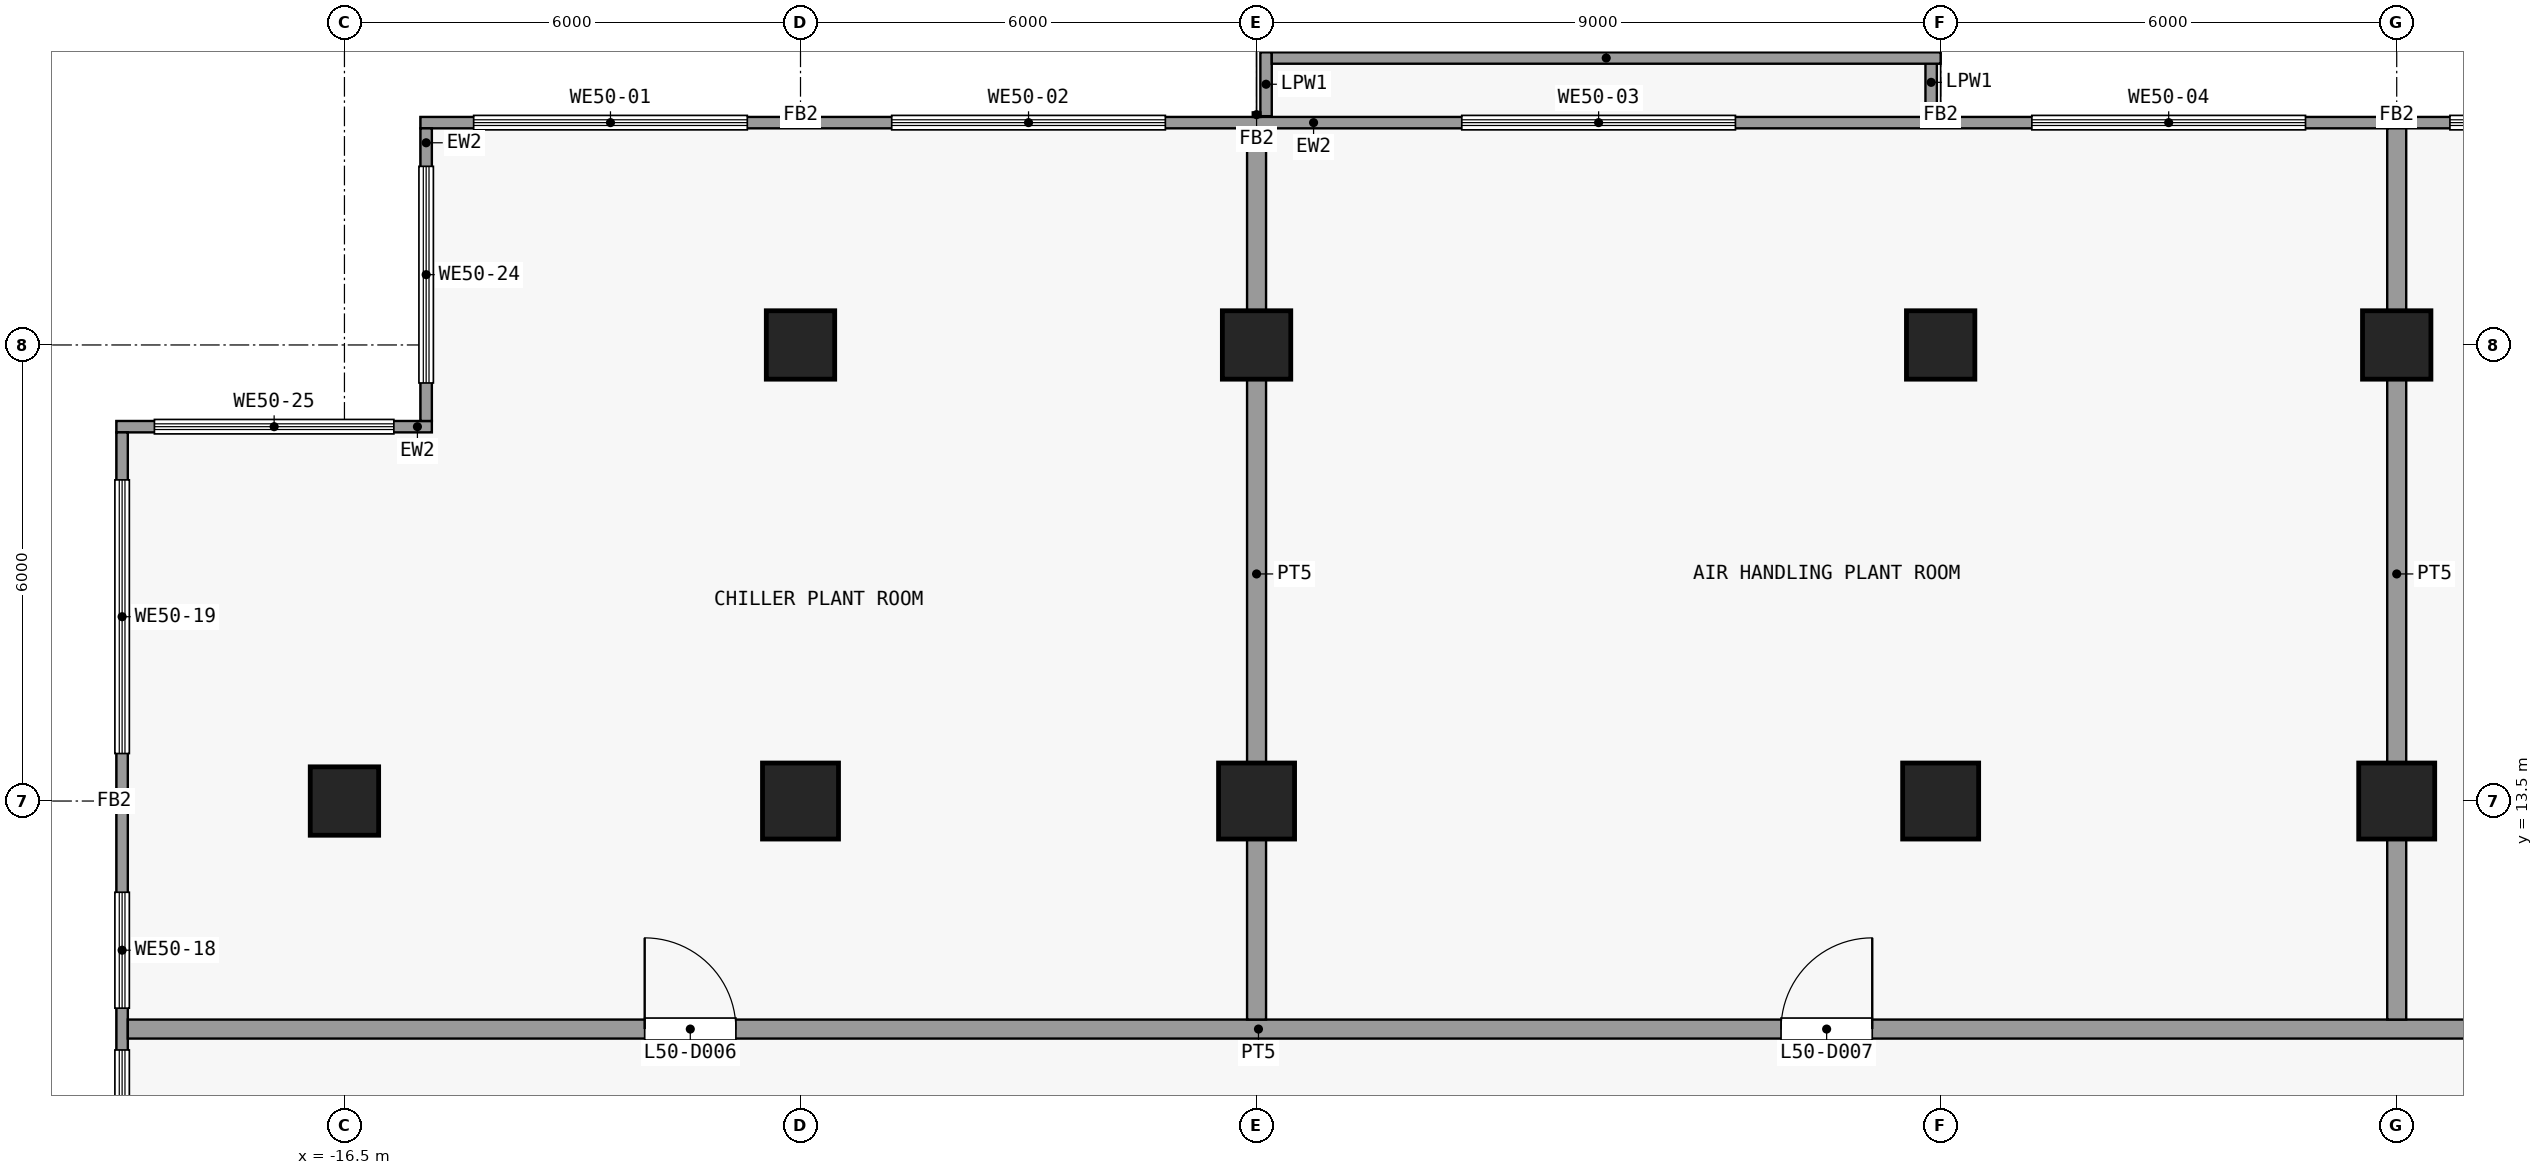
"""IFC4 building model, lengths in metres.
Left out: names, types, materials, properties, quantities, classifications, styles, units other than length and angle.
Written with IfcOpenShell. Run it as: python <this file> out.ifc"""

import sys

from ifc_helpers import new_model, si_unit, direction, frame, frame_2d, origin, origin_2d, place, context, subcontext, project, spatial, rectangle, extrude, element, fill, save


model = new_model("IFC4")
c1 = context("Model", 3, precision=1e-05, world=origin(), true_north=direction((0.0, 1.0)))
c2 = subcontext(c1, "Body", "Model", "MODEL_VIEW")
j1 = project(units=[si_unit("LENGTHUNIT", "METRE"), si_unit("PLANEANGLEUNIT", "RADIAN")], contexts=[c1])
p1 = place(None, origin())
s1 = spatial("IfcSite", under=j1, at=p1, CompositionType="ELEMENT")
p2 = place(p1, origin())
s2 = spatial("IfcBuilding", under=s1, at=p2, CompositionType="ELEMENT")
p3 = place(p2, frame((0.0, 0.0, 199.7)))
s3 = spatial("IfcBuildingStorey", under=s2, at=p3, CompositionType="ELEMENT", Elevation=199.7)
p4 = place(p3, frame((-16.5, 13.5, 0.0), z_axis=(0.0, 0.0, 1.0), x_axis=(1.0, 0.0, 0.0)))
e1 = element("IfcColumn", 1, at=p4, inside=s3, PredefinedType="COLUMN", context=c2, shape_type="SweptSolid", body=[
    extrude(rectangle(XDim=0.9, YDim=0.9, at=origin_2d()), origin(), (0.0, 0.0, 1.0), 5.4),
])
p5 = place(p3, frame((-10.5, 13.5, 0.0), z_axis=(0.0, 0.0, 1.0), x_axis=(1.0, 0.0, 0.0)))
e2 = element("IfcColumn", 2, at=p5, inside=s3, PredefinedType="COLUMN", context=c2, shape_type="SweptSolid", body=[
    extrude(rectangle(XDim=1.0, YDim=1.0, at=origin_2d()), origin(), (0.0, 0.0, 1.0), 5.4),
])
p6 = place(p3, frame((-10.5, 19.5, 0.0), z_axis=(0.0, 0.0, 1.0), x_axis=(1.0, 0.0, 0.0)))
e3 = element("IfcColumn", 3, at=p6, inside=s3, PredefinedType="COLUMN", context=c2, shape_type="SweptSolid", body=[
    extrude(rectangle(XDim=0.9, YDim=0.9, at=origin_2d()), origin(), (0.0, 0.0, 1.0), 5.4),
])
p7 = place(p3, frame((-4.5, 13.5, 0.0), z_axis=(0.0, 0.0, 1.0), x_axis=(1.0, 0.0, 0.0)))
e4 = element("IfcColumn", 4, at=p7, inside=s3, PredefinedType="COLUMN", context=c2, shape_type="SweptSolid", body=[
    extrude(rectangle(XDim=1.0, YDim=1.0, at=origin_2d()), origin(), (0.0, 0.0, 1.0), 5.4),
])
p8 = place(p3, frame((-4.5, 19.5, 0.0), z_axis=(0.0, 0.0, 1.0), x_axis=(1.0, 0.0, 0.0)))
e5 = element("IfcColumn", 5, at=p8, inside=s3, PredefinedType="COLUMN", context=c2, shape_type="SweptSolid", body=[
    extrude(rectangle(XDim=0.9, YDim=0.9, at=origin_2d()), origin(), (0.0, 0.0, 1.0), 5.4),
])
p9 = place(p3, frame((4.5, 13.5, 0.0), z_axis=(0.0, 0.0, 1.0), x_axis=(1.0, 0.0, 0.0)))
e6 = element("IfcColumn", 6, at=p9, inside=s3, PredefinedType="COLUMN", context=c2, shape_type="SweptSolid", body=[
    extrude(rectangle(XDim=1.0, YDim=1.0, at=origin_2d()), origin(), (0.0, 0.0, 1.0), 5.4),
])
p10 = place(p3, frame((4.5, 19.5, 0.0), z_axis=(0.0, 0.0, 1.0), x_axis=(1.0, 0.0, 0.0)))
e7 = element("IfcColumn", 7, at=p10, inside=s3, PredefinedType="COLUMN", context=c2, shape_type="SweptSolid", body=[
    extrude(rectangle(XDim=0.9, YDim=0.9, at=origin_2d()), origin(), (0.0, 0.0, 1.0), 5.4),
])
p11 = place(p3, frame((10.5, 13.5, 0.0), z_axis=(0.0, 0.0, 1.0), x_axis=(1.0, 0.0, 0.0)))
e8 = element("IfcColumn", 8, at=p11, inside=s3, PredefinedType="COLUMN", context=c2, shape_type="SweptSolid", body=[
    extrude(rectangle(XDim=1.0, YDim=1.0, at=origin_2d()), origin(), (0.0, 0.0, 1.0), 5.4),
])
p12 = place(p3, frame((10.5, 19.5, 0.0), z_axis=(0.0, 0.0, 1.0), x_axis=(1.0, 0.0, 0.0)))
e9 = element("IfcColumn", 9, at=p12, inside=s3, PredefinedType="COLUMN", context=c2, shape_type="SweptSolid", body=[
    extrude(rectangle(XDim=0.9, YDim=0.9, at=origin_2d()), origin(), (0.0, 0.0, 1.0), 5.4),
])
p13 = place(p3, frame((-15.5, 22.425, 0.0), z_axis=(0.0, 0.0, 1.0), x_axis=(1.0, 0.0, 0.0)))
e10 = element("IfcWall", 10, at=p13, inside=s3, PredefinedType="SOLIDWALL", context=c2, shape_type="SweptSolid", body=[
    extrude(rectangle(XDim=31.0, YDim=0.15, at=frame_2d((15.5, 0.0))), origin(), (0.0, 0.0, 1.0), 5.0),
])
p14 = place(p13, frame((0.7, 0.0, 1.2)))
e11 = element("IfcOpeningElement", 11, at=p14, cuts=e10, PredefinedType="OPENING", context=c2, shape_type="SweptSolid", body=[
    extrude(rectangle(XDim=3.6, YDim=3.0, at=frame_2d((1.8, 1.5))), frame((0.0, 0.085, 0.0), z_axis=(0.0, -1.0, 0.0), x_axis=(1.0, 0.0, 0.0)), (0.0, 0.0, 1.0), 0.17),
])
p15 = place(p13, frame((6.2, 0.0, 1.2)))
e12 = element("IfcOpeningElement", 12, at=p15, cuts=e10, PredefinedType="OPENING", context=c2, shape_type="SweptSolid", body=[
    extrude(rectangle(XDim=3.6, YDim=3.0, at=frame_2d((1.8, 1.5))), frame((0.0, 0.085, 0.0), z_axis=(0.0, -1.0, 0.0), x_axis=(1.0, 0.0, 0.0)), (0.0, 0.0, 1.0), 0.17),
])
p16 = place(p13, frame((13.7, 0.0, 1.2)))
e13 = element("IfcOpeningElement", 13, at=p16, cuts=e10, PredefinedType="OPENING", context=c2, shape_type="SweptSolid", body=[
    extrude(rectangle(XDim=3.6, YDim=3.0, at=frame_2d((1.8, 1.5))), frame((0.0, 0.085, 0.0), z_axis=(0.0, -1.0, 0.0), x_axis=(1.0, 0.0, 0.0)), (0.0, 0.0, 1.0), 0.17),
])
p17 = place(p13, frame((21.2, 0.0, 1.2)))
e14 = element("IfcOpeningElement", 14, at=p17, cuts=e10, PredefinedType="OPENING", context=c2, shape_type="SweptSolid", body=[
    extrude(rectangle(XDim=3.6, YDim=3.0, at=frame_2d((1.8, 1.5))), frame((0.0, 0.085, 0.0), z_axis=(0.0, -1.0, 0.0), x_axis=(1.0, 0.0, 0.0)), (0.0, 0.0, 1.0), 0.17),
])
p18 = place(p13, frame((26.7, 0.0, 1.2)))
e15 = element("IfcOpeningElement", 15, at=p18, cuts=e10, PredefinedType="OPENING", context=c2, shape_type="SweptSolid", body=[
    extrude(rectangle(XDim=3.6, YDim=3.0, at=frame_2d((1.8, 1.5))), frame((0.0, 0.085, 0.0), z_axis=(0.0, -1.0, 0.0), x_axis=(1.0, 0.0, 0.0)), (0.0, 0.0, 1.0), 0.17),
])
p19 = place(p3, frame((-19.425, -21.35, 0.0), z_axis=(0.0, 0.0, 1.0), x_axis=(0.0, 1.0, 0.0)))
e16 = element("IfcWall", 16, at=p19, inside=s3, PredefinedType="SOLIDWALL", context=c2, shape_type="SweptSolid", body=[
    extrude(rectangle(XDim=39.7, YDim=0.15, at=frame_2d((19.85, 0.0))), origin(), (0.0, 0.0, 1.0), 5.0),
])
p20 = place(p19, frame((2.125, 0.0, 1.2)))
e17 = element("IfcOpeningElement", 17, at=p20, cuts=e16, PredefinedType="OPENING", context=c2, shape_type="SweptSolid", body=[
    extrude(rectangle(XDim=3.6, YDim=3.0, at=frame_2d((1.8, 1.5))), frame((0.0, 0.085, 0.0), z_axis=(0.0, -1.0, 0.0), x_axis=(1.0, 0.0, 0.0)), (0.0, 0.0, 1.0), 0.17),
])
p21 = place(p19, frame((10.55, 0.0, 1.2)))
e18 = element("IfcOpeningElement", 18, at=p21, cuts=e16, PredefinedType="OPENING", context=c2, shape_type="SweptSolid", body=[
    extrude(rectangle(XDim=2.625, YDim=3.0, at=frame_2d((1.312, 1.5))), frame((0.0, 0.085, 0.0), z_axis=(0.0, -1.0, 0.0), x_axis=(1.0, 0.0, 0.0)), (0.0, 0.0, 1.0), 0.17),
])
p22 = place(p19, frame((18.05, 0.0, 1.2)))
e19 = element("IfcOpeningElement", 19, at=p22, cuts=e16, PredefinedType="OPENING", context=c2, shape_type="SweptSolid", body=[
    extrude(rectangle(XDim=3.6, YDim=3.0, at=frame_2d((1.8, 1.5))), frame((0.0, 0.085, 0.0), z_axis=(0.0, -1.0, 0.0), x_axis=(1.0, 0.0, 0.0)), (0.0, 0.0, 1.0), 0.17),
])
p23 = place(p19, frame((24.05, 0.0, 1.2)))
e20 = element("IfcOpeningElement", 20, at=p23, cuts=e16, PredefinedType="OPENING", context=c2, shape_type="SweptSolid", body=[
    extrude(rectangle(XDim=3.6, YDim=3.0, at=frame_2d((1.8, 1.5))), frame((0.0, 0.085, 0.0), z_axis=(0.0, -1.0, 0.0), x_axis=(1.0, 0.0, 0.0)), (0.0, 0.0, 1.0), 0.17),
])
p24 = place(p19, frame((30.05, 0.0, 1.2)))
e21 = element("IfcOpeningElement", 21, at=p24, cuts=e16, PredefinedType="OPENING", context=c2, shape_type="SweptSolid", body=[
    extrude(rectangle(XDim=1.525, YDim=3.0, at=frame_2d((0.762, 1.5))), frame((0.0, 0.085, 0.0), z_axis=(0.0, -1.0, 0.0), x_axis=(1.0, 0.0, 0.0)), (0.0, 0.0, 1.0), 0.17),
])
p25 = place(p19, frame((32.125, 0.0, 1.2)))
e22 = element("IfcOpeningElement", 22, at=p25, cuts=e16, PredefinedType="OPENING", context=c2, shape_type="SweptSolid", body=[
    extrude(rectangle(XDim=1.525, YDim=3.0, at=frame_2d((0.762, 1.5))), frame((0.0, 0.085, 0.0), z_axis=(0.0, -1.0, 0.0), x_axis=(1.0, 0.0, 0.0)), (0.0, 0.0, 1.0), 0.17),
])
p26 = place(p19, frame((35.475, 0.0, 1.2)))
e23 = element("IfcOpeningElement", 23, at=p26, cuts=e16, PredefinedType="OPENING", context=c2, shape_type="SweptSolid", body=[
    extrude(rectangle(XDim=3.6, YDim=3.0, at=frame_2d((1.8, 1.5))), frame((0.0, 0.085, 0.0), z_axis=(0.0, -1.0, 0.0), x_axis=(1.0, 0.0, 0.0)), (0.0, 0.0, 1.0), 0.17),
])
p27 = place(p3, frame((-15.425, 18.5, 0.0), z_axis=(0.0, 0.0, 1.0), x_axis=(0.0, 1.0, 0.0)))
e24 = element("IfcWall", 24, at=p27, inside=s3, PredefinedType="SOLIDWALL", context=c2, shape_type="SweptSolid", body=[
    extrude(rectangle(XDim=3.85, YDim=0.15, at=frame_2d((1.925, 0.0))), origin(), (0.0, 0.0, 1.0), 5.0),
])
p28 = place(p27, frame((0.5, 0.0, 1.2)))
e25 = element("IfcOpeningElement", 25, at=p28, cuts=e24, PredefinedType="OPENING", context=c2, shape_type="SweptSolid", body=[
    extrude(rectangle(XDim=2.85, YDim=3.0, at=frame_2d((1.425, 1.5))), frame((0.0, 0.085, 0.0), z_axis=(0.0, -1.0, 0.0), x_axis=(1.0, 0.0, 0.0)), (0.0, 0.0, 1.0), 0.17),
])
p29 = place(p3, frame((-19.5, 18.425, 0.0), z_axis=(0.0, 0.0, 1.0), x_axis=(1.0, 0.0, 0.0)))
e26 = element("IfcWall", 26, at=p29, inside=s3, PredefinedType="SOLIDWALL", context=c2, shape_type="SweptSolid", body=[
    extrude(rectangle(XDim=4.15, YDim=0.15, at=frame_2d((2.075, 0.0))), origin(), (0.0, 0.0, 1.0), 5.0),
])
p30 = place(p29, frame((0.5, 0.0, 1.2)))
e27 = element("IfcOpeningElement", 27, at=p30, cuts=e26, PredefinedType="OPENING", context=c2, shape_type="SweptSolid", body=[
    extrude(rectangle(XDim=3.15, YDim=3.0, at=frame_2d((1.575, 1.5))), frame((0.0, 0.085, 0.0), z_axis=(0.0, -1.0, 0.0), x_axis=(1.0, 0.0, 0.0)), (0.0, 0.0, 1.0), 0.17),
])
p31 = place(p3, frame((4.375, 23.4, 0.0), z_axis=(0.0, 0.0, 1.0), x_axis=(0.0, -1.0, 0.0)))
e28 = element("IfcWall", 28, at=p31, inside=s3, PredefinedType="PARAPET", context=c2, shape_type="SweptSolid", body=[
    extrude(rectangle(XDim=0.89, YDim=0.15, at=frame_2d((0.445, 0.0))), origin(), (0.0, 0.0, 1.0), 1.15),
])
p32 = place(p3, frame((-4.375, 22.51, 0.0), z_axis=(0.0, 0.0, 1.0), x_axis=(0.0, 1.0, 0.0)))
e29 = element("IfcWall", 29, at=p32, inside=s3, PredefinedType="PARAPET", context=c2, shape_type="SweptSolid", body=[
    extrude(rectangle(XDim=0.84, YDim=0.15, at=frame_2d((0.42, 0.0))), origin(), (0.0, 0.0, 1.0), 1.15),
])
p33 = place(p3, frame((-4.3, 23.275, 0.0), z_axis=(0.0, 0.0, 1.0), x_axis=(1.0, 0.0, 0.0)))
e30 = element("IfcWall", 30, at=p33, inside=s3, PredefinedType="PARAPET", context=c2, shape_type="SweptSolid", body=[
    extrude(rectangle(XDim=8.8, YDim=0.15, at=frame_2d((4.4, 0.0))), origin(), (0.0, 0.0, 1.0), 1.15),
])
p34 = place(p3, frame((-19.35, 10.5, 0.0), z_axis=(0.0, 0.0, 1.0), x_axis=(1.0, 0.0, 0.0)))
e31 = element("IfcWall", 31, at=p34, inside=s3, PredefinedType="PARTITIONING", context=c2, shape_type="SweptSolid", body=[
    extrude(rectangle(XDim=38.7, YDim=0.25, at=frame_2d((19.35, 0.0))), origin(), (0.0, 0.0, 1.0), 5.0),
])
p35 = place(p34, frame((6.8, 0.0, 0.0)))
e32 = element("IfcOpeningElement", 32, at=p35, cuts=e31, PredefinedType="OPENING", context=c2, shape_type="SweptSolid", body=[
    extrude(rectangle(XDim=1.2, YDim=2.1, at=frame_2d((0.6, 1.05))), frame((0.0, 0.135, 0.0), z_axis=(0.0, -1.0, 0.0), x_axis=(1.0, 0.0, 0.0)), (0.0, 0.0, 1.0), 0.27),
])
p36 = place(p34, frame((21.75, 0.0, 0.0)))
e33 = element("IfcOpeningElement", 33, at=p36, cuts=e31, PredefinedType="OPENING", context=c2, shape_type="SweptSolid", body=[
    extrude(rectangle(XDim=1.2, YDim=2.1, at=frame_2d((0.6, 1.05))), frame((0.0, 0.135, 0.0), z_axis=(0.0, -1.0, 0.0), x_axis=(1.0, 0.0, 0.0)), (0.0, 0.0, 1.0), 0.27),
])
p37 = place(p34, frame((33.65, 0.0, 0.0)))
e34 = element("IfcOpeningElement", 34, at=p37, cuts=e31, PredefinedType="OPENING", context=c2, shape_type="SweptSolid", body=[
    extrude(rectangle(XDim=1.2, YDim=2.1, at=frame_2d((0.6, 1.05))), frame((0.0, 0.135, 0.0), z_axis=(0.0, -1.0, 0.0), x_axis=(1.0, 0.0, 0.0)), (0.0, 0.0, 1.0), 0.27),
])
for number, where, z_axis, x_axis in (
    (35, (-4.5, 10.625, 0.0), (0.0, 0.0, 1.0), (0.0, 1.0, 0.0)),
    (36, (10.5, 10.625, 0.0), (0.0, 0.0, 1.0), (0.0, 1.0, 0.0)),
):
    element("IfcWall", number, at=place(p3, frame(where, z_axis=z_axis, x_axis=x_axis)), inside=s3, PredefinedType="PARTITIONING", context=c2, shape_type="SweptSolid", body=[
        extrude(rectangle(XDim=11.725, YDim=0.25, at=frame_2d((5.863, 0.0))), origin(), (0.0, 0.0, 1.0), 5.0),
    ])
p38 = place(p14, origin())
e37 = element("IfcWindow", 37, at=p38, inside=s3, PartitioningType="SINGLE_PANEL", PredefinedType="WINDOW", context=c2, shape_type="SweptSolid", body=[
    extrude(rectangle(XDim=3.6, YDim=3.0, at=frame_2d((1.8, 1.5))), frame((0.0, 0.03, 0.0), z_axis=(0.0, -1.0, 0.0), x_axis=(1.0, 0.0, 0.0)), (0.0, 0.0, 1.0), 0.06),
])
fill(e11, e37)
p39 = place(p15, origin())
e38 = element("IfcWindow", 38, at=p39, inside=s3, PartitioningType="SINGLE_PANEL", PredefinedType="WINDOW", context=c2, shape_type="SweptSolid", body=[
    extrude(rectangle(XDim=3.6, YDim=3.0, at=frame_2d((1.8, 1.5))), frame((0.0, 0.03, 0.0), z_axis=(0.0, -1.0, 0.0), x_axis=(1.0, 0.0, 0.0)), (0.0, 0.0, 1.0), 0.06),
])
fill(e12, e38)
p40 = place(p16, origin())
e39 = element("IfcWindow", 39, at=p40, inside=s3, PartitioningType="SINGLE_PANEL", PredefinedType="WINDOW", context=c2, shape_type="SweptSolid", body=[
    extrude(rectangle(XDim=3.6, YDim=3.0, at=frame_2d((1.8, 1.5))), frame((0.0, 0.03, 0.0), z_axis=(0.0, -1.0, 0.0), x_axis=(1.0, 0.0, 0.0)), (0.0, 0.0, 1.0), 0.06),
])
fill(e13, e39)
p41 = place(p17, origin())
e40 = element("IfcWindow", 40, at=p41, inside=s3, PartitioningType="SINGLE_PANEL", PredefinedType="WINDOW", context=c2, shape_type="SweptSolid", body=[
    extrude(rectangle(XDim=3.6, YDim=3.0, at=frame_2d((1.8, 1.5))), frame((0.0, 0.03, 0.0), z_axis=(0.0, -1.0, 0.0), x_axis=(1.0, 0.0, 0.0)), (0.0, 0.0, 1.0), 0.06),
])
fill(e14, e40)
p42 = place(p18, origin())
e41 = element("IfcWindow", 41, at=p42, inside=s3, PartitioningType="SINGLE_PANEL", PredefinedType="WINDOW", context=c2, shape_type="SweptSolid", body=[
    extrude(rectangle(XDim=3.6, YDim=3.0, at=frame_2d((1.8, 1.5))), frame((0.0, 0.03, 0.0), z_axis=(0.0, -1.0, 0.0), x_axis=(1.0, 0.0, 0.0)), (0.0, 0.0, 1.0), 0.06),
])
fill(e15, e41)
p43 = place(p24, origin())
e42 = element("IfcWindow", 42, at=p43, inside=s3, PartitioningType="SINGLE_PANEL", PredefinedType="WINDOW", context=c2, shape_type="SweptSolid", body=[
    extrude(rectangle(XDim=1.525, YDim=3.0, at=frame_2d((0.762, 1.5))), frame((0.0, 0.03, 0.0), z_axis=(0.0, -1.0, 0.0), x_axis=(1.0, 0.0, 0.0)), (0.0, 0.0, 1.0), 0.06),
])
fill(e21, e42)
p44 = place(p25, origin())
e43 = element("IfcWindow", 43, at=p44, inside=s3, PartitioningType="SINGLE_PANEL", PredefinedType="WINDOW", context=c2, shape_type="SweptSolid", body=[
    extrude(rectangle(XDim=1.525, YDim=3.0, at=frame_2d((0.762, 1.5))), frame((0.0, 0.03, 0.0), z_axis=(0.0, -1.0, 0.0), x_axis=(1.0, 0.0, 0.0)), (0.0, 0.0, 1.0), 0.06),
])
fill(e22, e43)
p45 = place(p26, origin())
e44 = element("IfcWindow", 44, at=p45, inside=s3, PartitioningType="SINGLE_PANEL", PredefinedType="WINDOW", context=c2, shape_type="SweptSolid", body=[
    extrude(rectangle(XDim=3.6, YDim=3.0, at=frame_2d((1.8, 1.5))), frame((0.0, 0.03, 0.0), z_axis=(0.0, -1.0, 0.0), x_axis=(1.0, 0.0, 0.0)), (0.0, 0.0, 1.0), 0.06),
])
fill(e23, e44)
p46 = place(p28, origin())
e45 = element("IfcWindow", 45, at=p46, inside=s3, PartitioningType="SINGLE_PANEL", PredefinedType="WINDOW", context=c2, shape_type="SweptSolid", body=[
    extrude(rectangle(XDim=2.85, YDim=3.0, at=frame_2d((1.425, 1.5))), frame((0.0, 0.03, 0.0), z_axis=(0.0, -1.0, 0.0), x_axis=(1.0, 0.0, 0.0)), (0.0, 0.0, 1.0), 0.06),
])
fill(e25, e45)
p47 = place(p30, origin())
e46 = element("IfcWindow", 46, at=p47, inside=s3, PartitioningType="SINGLE_PANEL", PredefinedType="WINDOW", context=c2, shape_type="SweptSolid", body=[
    extrude(rectangle(XDim=3.15, YDim=3.0, at=frame_2d((1.575, 1.5))), frame((0.0, 0.03, 0.0), z_axis=(0.0, -1.0, 0.0), x_axis=(1.0, 0.0, 0.0)), (0.0, 0.0, 1.0), 0.06),
])
fill(e27, e46)
p48 = place(p35, origin())
e47 = element("IfcDoor", 47, at=p48, inside=s3, OperationType="SINGLE_SWING_RIGHT", PredefinedType="DOOR", context=c2, shape_type="SweptSolid", body=[
    extrude(rectangle(XDim=1.2, YDim=2.1, at=frame_2d((0.6, 1.05))), frame((0.0, 0.025, 0.0), z_axis=(0.0, -1.0, 0.0), x_axis=(1.0, 0.0, 0.0)), (0.0, 0.0, 1.0), 0.05),
])
fill(e32, e47)
p49 = place(p36, origin())
e48 = element("IfcDoor", 48, at=p49, inside=s3, OperationType="SINGLE_SWING_LEFT", PredefinedType="DOOR", context=c2, shape_type="SweptSolid", body=[
    extrude(rectangle(XDim=1.2, YDim=2.1, at=frame_2d((0.6, 1.05))), frame((0.0, 0.025, 0.0), z_axis=(0.0, -1.0, 0.0), x_axis=(1.0, 0.0, 0.0)), (0.0, 0.0, 1.0), 0.05),
])
fill(e33, e48)
save(model, sys.argv[1])
